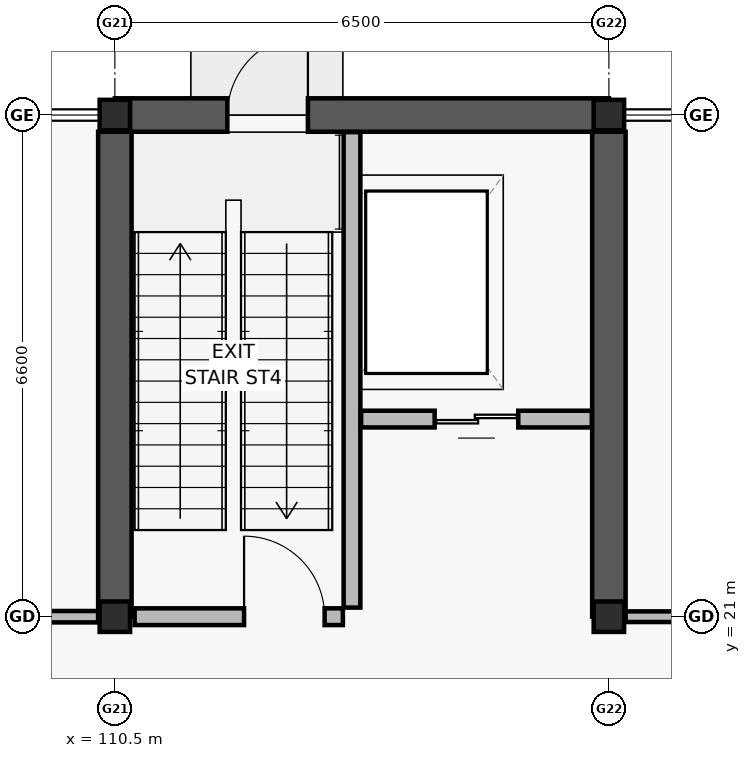
"""IFC4 building model, lengths in metres.
Left out: names, types, materials, properties, quantities, classifications, styles, units other than length and angle.
Written with IfcOpenShell. Run it as: python <this file> out.ifc"""

import sys

from ifc_helpers import new_model, si_unit, direction, frame, frame_2d, origin, origin_2d, place, context, subcontext, project, spatial, rectangle, i_section, extrude, element, fill, save


model = new_model("IFC4")
c1 = context("Model", 3, precision=1e-05, world=origin(), true_north=direction((0.0, 1.0)))
c2 = subcontext(c1, "Body", "Model", "MODEL_VIEW")
j1 = project(units=[si_unit("LENGTHUNIT", "METRE"), si_unit("PLANEANGLEUNIT", "RADIAN")], contexts=[c1])
p1 = place(None, origin())
s1 = spatial("IfcSite", under=j1, at=p1, CompositionType="ELEMENT")
p2 = place(p1, origin())
s2 = spatial("IfcBuilding", under=s1, at=p2, CompositionType="ELEMENT")
p3 = place(p2, origin())
s3 = spatial("IfcBuildingStorey", under=s2, at=p3, CompositionType="ELEMENT", Elevation=0.0)
for number, where, z_axis, x_axis in (
    (1, (110.5, 21.0, 0.0), (0.0, 0.0, 1.0), (1.0, 0.0, 0.0)),
    (2, (110.5, 27.6, 0.0), (0.0, 0.0, 1.0), (1.0, 0.0, 0.0)),
    (3, (117.0, 21.0, 0.0), (0.0, 0.0, 1.0), (1.0, 0.0, 0.0)),
    (4, (117.0, 27.6, 0.0), (0.0, 0.0, 1.0), (1.0, 0.0, 0.0)),
):
    element("IfcColumn", number, at=place(p3, frame(where, z_axis=z_axis, x_axis=x_axis)), inside=s3, PredefinedType="COLUMN", context=c2, shape_type="SweptSolid", body=[
        extrude(i_section(OverallWidth=0.4, OverallDepth=0.4, WebThickness=0.02, FlangeThickness=0.032, at=origin_2d()), origin(), (0.0, 0.0, 1.0), 5.4),
    ])
p4 = place(p3, frame((110.5, 27.6, 0.0), z_axis=(0.0, 0.0, 1.0), x_axis=(1.0, 0.0, 0.0)))
e5 = element("IfcWall", 5, at=p4, inside=s3, PredefinedType="SHEAR", context=c2, shape_type="SweptSolid", body=[
    extrude(rectangle(XDim=6.5, YDim=0.44, at=frame_2d((3.25, 0.0))), origin(), (0.0, 0.0, 1.0), 5.16),
])
p5 = place(p4, frame((1.48, 0.0, 0.0)))
e6 = element("IfcOpeningElement", 6, at=p5, cuts=e5, PredefinedType="OPENING", context=c2, shape_type="SweptSolid", body=[
    extrude(rectangle(XDim=1.06, YDim=2.12, at=frame_2d((0.53, 1.06))), frame((0.0, 0.23, 0.0), z_axis=(0.0, -1.0, 0.0), x_axis=(1.0, 0.0, 0.0)), (0.0, 0.0, 1.0), 0.46),
])
for number, where, z_axis, x_axis in (
    (7, (110.5, 21.0, 0.0), (0.0, 0.0, 1.0), (0.0, 1.0, 0.0)),
    (8, (117.0, 21.0, 0.0), (0.0, 0.0, 1.0), (0.0, 1.0, 0.0)),
):
    element("IfcWall", number, at=place(p3, frame(where, z_axis=z_axis, x_axis=x_axis)), inside=s3, PredefinedType="SHEAR", context=c2, shape_type="SweptSolid", body=[
        extrude(rectangle(XDim=6.38, YDim=0.44, at=frame_2d((3.19, 0.0))), origin(), (0.0, 0.0, 1.0), 5.16),
    ])
p6 = place(p3, frame((113.62, 21.12, 0.0), z_axis=(0.0, 0.0, 1.0), x_axis=(0.0, 1.0, 0.0)))
e9 = element("IfcWall", 9, at=p6, inside=s3, PredefinedType="SOLIDWALL", context=c2, shape_type="SweptSolid", body=[
    extrude(rectangle(XDim=6.255, YDim=0.22, at=frame_2d((3.127, 0.0))), origin(), (0.0, 0.0, 1.0), 5.16),
])
p7 = place(p3, frame((110.76, 21.0, 0.0), z_axis=(0.0, 0.0, 1.0), x_axis=(1.0, 0.0, 0.0)))
e10 = element("IfcWall", 10, at=p7, inside=s3, PredefinedType="SOLIDWALL", context=c2, shape_type="SweptSolid", body=[
    extrude(rectangle(XDim=2.74, YDim=0.22, at=frame_2d((1.37, 0.0))), origin(), (0.0, 0.0, 1.0), 4.52),
])
p8 = place(p7, frame((1.44, 0.0, 0.0)))
e11 = element("IfcOpeningElement", 11, at=p8, cuts=e10, PredefinedType="OPENING", context=c2, shape_type="SweptSolid", body=[
    extrude(rectangle(XDim=1.06, YDim=2.1, at=frame_2d((0.53, 1.05))), frame((0.0, 0.12, 0.0), z_axis=(0.0, -1.0, 0.0), x_axis=(1.0, 0.0, 0.0)), (0.0, 0.0, 1.0), 0.24),
])
p9 = place(p3, frame((113.74, 23.6, 0.0), z_axis=(0.0, 0.0, 1.0), x_axis=(1.0, 0.0, 0.0)))
e12 = element("IfcWall", 12, at=p9, inside=s3, PredefinedType="SOLIDWALL", context=c2, shape_type="SweptSolid", body=[
    extrude(rectangle(XDim=3.035, YDim=0.22, at=frame_2d((1.518, 0.0))), origin(), (0.0, 0.0, 1.0), 5.16),
])
p10 = place(p9, frame((0.968, 0.0, 0.0)))
e13 = element("IfcOpeningElement", 13, at=p10, cuts=e12, PredefinedType="OPENING", context=c2, shape_type="SweptSolid", body=[
    extrude(rectangle(XDim=1.1, YDim=2.1, at=frame_2d((0.55, 1.05))), frame((0.0, 0.12, 0.0), z_axis=(0.0, -1.0, 0.0), x_axis=(1.0, 0.0, 0.0)), (0.0, 0.0, 1.0), 0.24),
])
p11 = place(p3, frame((104.22, 21.0, 0.0), z_axis=(0.0, 0.0, 1.0), x_axis=(1.0, 0.0, 0.0)))
e14 = element("IfcWall", 14, at=p11, inside=s3, PredefinedType="PARTITIONING", context=c2, shape_type="SweptSolid", body=[
    extrude(rectangle(XDim=6.06, YDim=0.15, at=frame_2d((3.03, 0.0))), origin(), (0.0, 0.0, 1.0), 4.5),
])
p12 = place(p11, frame((2.29, 0.0, 0.0)))
e15 = element("IfcOpeningElement", 15, at=p12, cuts=e14, PredefinedType="OPENING", context=c2, shape_type="SweptSolid", body=[
    extrude(rectangle(XDim=1.48, YDim=2.18, at=frame_2d((0.74, 1.09))), frame((0.0, 0.085, 0.0), z_axis=(0.0, -1.0, 0.0), x_axis=(1.0, 0.0, 0.0)), (0.0, 0.0, 1.0), 0.17),
])
p13 = place(p3, frame((117.22, 21.0, 0.0), z_axis=(0.0, 0.0, 1.0), x_axis=(1.0, 0.0, 0.0)))
e16 = element("IfcWall", 16, at=p13, inside=s3, PredefinedType="PARTITIONING", context=c2, shape_type="SweptSolid", body=[
    extrude(rectangle(XDim=3.67, YDim=0.14, at=frame_2d((1.835, 0.0))), origin(), (0.0, 0.0, 1.0), 4.5),
])
p14 = place(p13, frame((1.055, 0.0, 0.0)))
e17 = element("IfcOpeningElement", 17, at=p14, cuts=e16, PredefinedType="OPENING", context=c2, shape_type="SweptSolid", body=[
    extrude(rectangle(XDim=1.56, YDim=2.18, at=frame_2d((0.78, 1.09))), frame((0.0, 0.08, 0.0), z_axis=(0.0, -1.0, 0.0), x_axis=(1.0, 0.0, 0.0)), (0.0, 0.0, 1.0), 0.16),
])
p15 = place(p8, origin())
e18 = element("IfcDoor", 18, at=p15, inside=s3, OperationType="SINGLE_SWING_LEFT", PredefinedType="DOOR", context=c2, shape_type="SweptSolid", body=[
    extrude(rectangle(XDim=1.06, YDim=2.1, at=frame_2d((0.53, 1.05))), frame((0.0, 0.025, 0.0), z_axis=(0.0, -1.0, 0.0), x_axis=(1.0, 0.0, 0.0)), (0.0, 0.0, 1.0), 0.05),
])
fill(e11, e18)
p16 = place(p5, origin())
e19 = element("IfcDoor", 19, at=p16, inside=s3, OperationType="SINGLE_SWING_RIGHT", PredefinedType="DOOR", context=c2, shape_type="SweptSolid", body=[
    extrude(rectangle(XDim=1.06, YDim=2.12, at=frame_2d((0.53, 1.06))), frame((0.0, 0.025, 0.0), z_axis=(0.0, -1.0, 0.0), x_axis=(1.0, 0.0, 0.0)), (0.0, 0.0, 1.0), 0.05),
])
fill(e6, e19)
p17 = place(p10, origin())
e20 = element("IfcDoor", 20, at=p17, inside=s3, OperationType="DOUBLE_DOOR_SLIDING", PredefinedType="DOOR", context=c2, shape_type="SweptSolid", body=[
    extrude(rectangle(XDim=1.1, YDim=2.1, at=frame_2d((0.55, 1.05))), frame((0.0, 0.025, 0.0), z_axis=(0.0, -1.0, 0.0), x_axis=(1.0, 0.0, 0.0)), (0.0, 0.0, 1.0), 0.05),
])
fill(e13, e20)
save(model, sys.argv[1])
